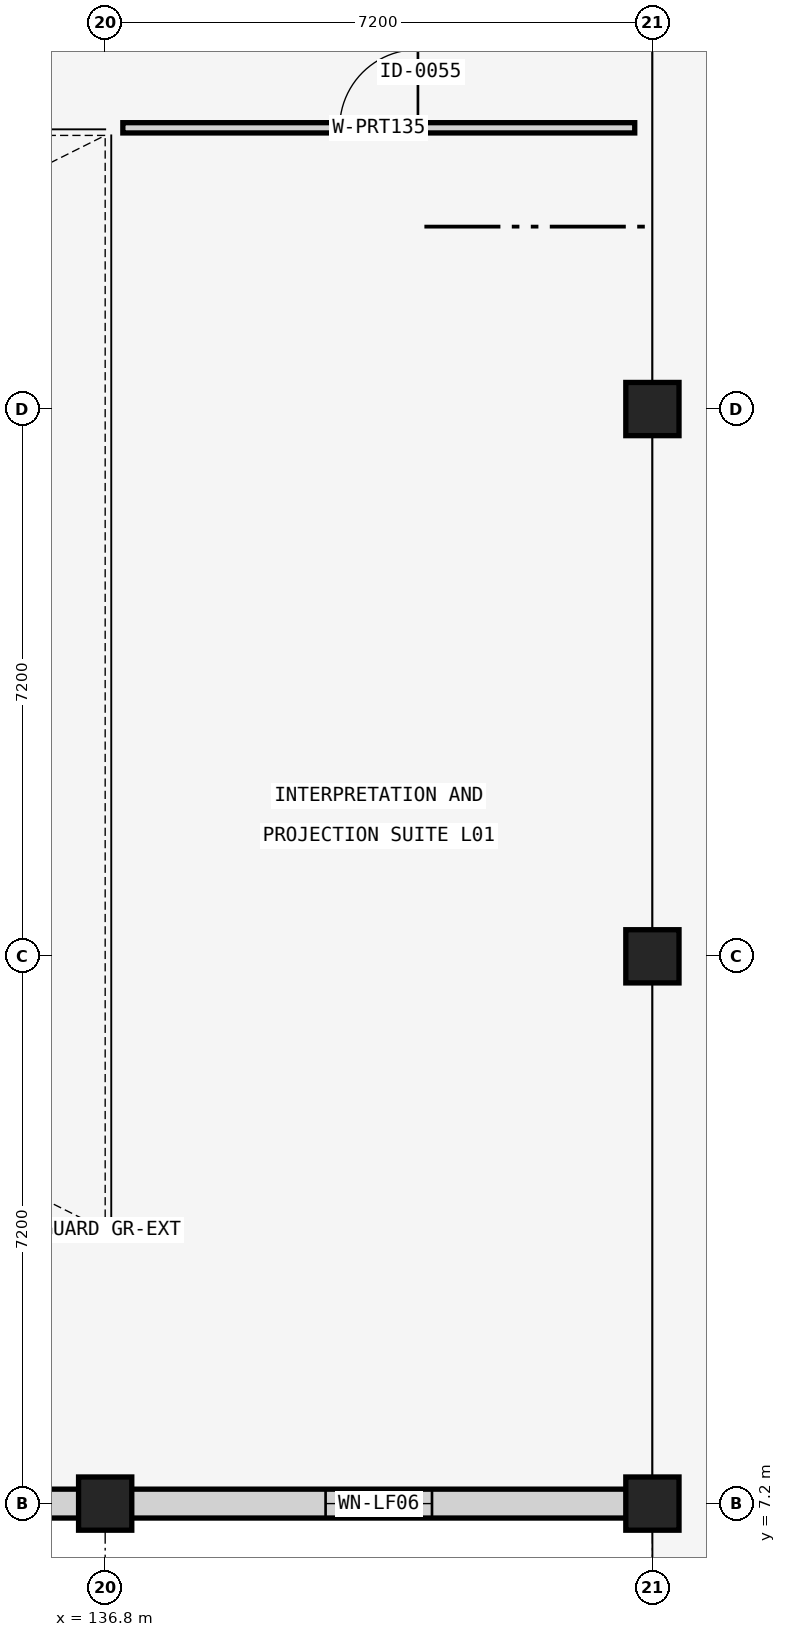
"""IFC4 building model, lengths in metres.
Left out: names, types, materials, properties, quantities, classifications, styles, units other than length and angle.
Written with IfcOpenShell. Run it as: python <this file> out.ifc"""

import sys

from ifc_helpers import new_model, si_unit, direction, frame, frame_2d, origin, origin_2d, place, context, subcontext, project, spatial, rectangle, extrude, element, fill, save


model = new_model("IFC4")
c1 = context("Model", 3, precision=1e-05, world=origin(), true_north=direction((0.0, 1.0)))
c2 = subcontext(c1, "Body", "Model", "MODEL_VIEW")
j1 = project(units=[si_unit("LENGTHUNIT", "METRE"), si_unit("PLANEANGLEUNIT", "RADIAN")], contexts=[c1])
p1 = place(None, origin())
s1 = spatial("IfcSite", under=j1, at=p1, CompositionType="ELEMENT")
p2 = place(p1, origin())
s2 = spatial("IfcBuilding", under=s1, at=p2, CompositionType="ELEMENT")
p3 = place(p2, frame((0.0, 0.0, 4.8)))
s3 = spatial("IfcBuildingStorey", under=s2, at=p3, CompositionType="ELEMENT", Elevation=4.8)
for number, where, z_axis, x_axis in (
    (1, (136.8, 7.2, 0.0), (0.0, 0.0, 1.0), (1.0, 0.0, 0.0)),
    (2, (144.0, 7.2, 0.0), (0.0, 0.0, 1.0), (1.0, 0.0, 0.0)),
    (3, (144.0, 14.4, 0.0), (0.0, 0.0, 1.0), (1.0, 0.0, 0.0)),
    (4, (144.0, 21.6, 0.0), (0.0, 0.0, 1.0), (1.0, 0.0, 0.0)),
):
    element("IfcColumn", number, at=place(p3, frame(where, z_axis=z_axis, x_axis=x_axis)), inside=s3, PredefinedType="COLUMN", context=c2, shape_type="SweptSolid", body=[
        extrude(rectangle(XDim=0.7, YDim=0.7, at=origin_2d()), origin(), (0.0, 0.0, 1.0), 4.16),
    ])
p4 = place(p3, frame((129.94, 7.2, 0.0), z_axis=(0.0, 0.0, 1.0), x_axis=(1.0, 0.0, 0.0)))
e5 = element("IfcWall", 5, at=p4, inside=s3, PredefinedType="SOLIDWALL", context=c2, shape_type="SweptSolid", body=[
    extrude(rectangle(XDim=6.52, YDim=0.38, at=frame_2d((3.26, 0.0))), origin(), (0.0, 0.0, 1.0), 3.21),
])
p5 = place(p4, frame((1.66, 0.0, 0.65)))
e6 = element("IfcOpeningElement", 6, at=p5, cuts=e5, PredefinedType="OPENING", context=c2, shape_type="SweptSolid", body=[
    extrude(rectangle(XDim=3.2, YDim=2.4, at=frame_2d((1.6, 1.2))), frame((0.0, 0.2, 0.0), z_axis=(0.0, -1.0, 0.0), x_axis=(1.0, 0.0, 0.0)), (0.0, 0.0, 1.0), 0.4),
])
p6 = place(p3, frame((137.14, 7.2, 0.0), z_axis=(0.0, 0.0, 1.0), x_axis=(1.0, 0.0, 0.0)))
e7 = element("IfcWall", 7, at=p6, inside=s3, PredefinedType="SOLIDWALL", context=c2, shape_type="SweptSolid", body=[
    extrude(rectangle(XDim=6.52, YDim=0.38, at=frame_2d((3.26, 0.0))), origin(), (0.0, 0.0, 1.0), 3.21),
])
p7 = place(p6, frame((2.56, 0.0, 0.85)))
e8 = element("IfcOpeningElement", 8, at=p7, cuts=e7, PredefinedType="OPENING", context=c2, shape_type="SweptSolid", body=[
    extrude(rectangle(XDim=1.4, YDim=2.2, at=frame_2d((0.7, 1.1))), frame((0.0, 0.2, 0.0), z_axis=(0.0, -1.0, 0.0), x_axis=(1.0, 0.0, 0.0)), (0.0, 0.0, 1.0), 0.4),
])
p8 = place(p3, frame((137.032, 25.3, 0.0), z_axis=(0.0, 0.0, 1.0), x_axis=(1.0, 0.0, 0.0)))
e9 = element("IfcWall", 9, at=p8, inside=s3, PredefinedType="PARTITIONING", context=c2, shape_type="SweptSolid", body=[
    extrude(rectangle(XDim=6.735, YDim=0.135, at=frame_2d((3.368, 0.0))), origin(), (0.0, 0.0, 1.0), 3.21),
])
p9 = place(p8, frame((2.853, 0.0, 0.0)))
e10 = element("IfcOpeningElement", 10, at=p9, cuts=e9, PredefinedType="OPENING", context=c2, shape_type="SweptSolid", body=[
    extrude(rectangle(XDim=1.03, YDim=2.08, at=frame_2d((0.515, 1.04))), frame((0.0, 0.078, 0.0), z_axis=(0.0, -1.0, 0.0), x_axis=(1.0, 0.0, 0.0)), (0.0, 0.0, 1.0), 0.155),
])
p10 = place(p7, origin())
e11 = element("IfcWindow", 11, at=p10, inside=s3, PartitioningType="SINGLE_PANEL", PredefinedType="WINDOW", context=c2, shape_type="SweptSolid", body=[
    extrude(rectangle(XDim=1.4, YDim=2.2, at=frame_2d((0.7, 1.1))), frame((0.0, 0.03, 0.0), z_axis=(0.0, -1.0, 0.0), x_axis=(1.0, 0.0, 0.0)), (0.0, 0.0, 1.0), 0.06),
])
fill(e8, e11)
p11 = place(p9, origin())
e12 = element("IfcDoor", 12, at=p11, inside=s3, OperationType="SINGLE_SWING_RIGHT", PredefinedType="DOOR", context=c2, shape_type="SweptSolid", body=[
    extrude(rectangle(XDim=1.03, YDim=2.08, at=frame_2d((0.515, 1.04))), frame((0.0, 0.025, 0.0), z_axis=(0.0, -1.0, 0.0), x_axis=(1.0, 0.0, 0.0)), (0.0, 0.0, 1.0), 0.05),
])
fill(e10, e12)
save(model, sys.argv[1])
